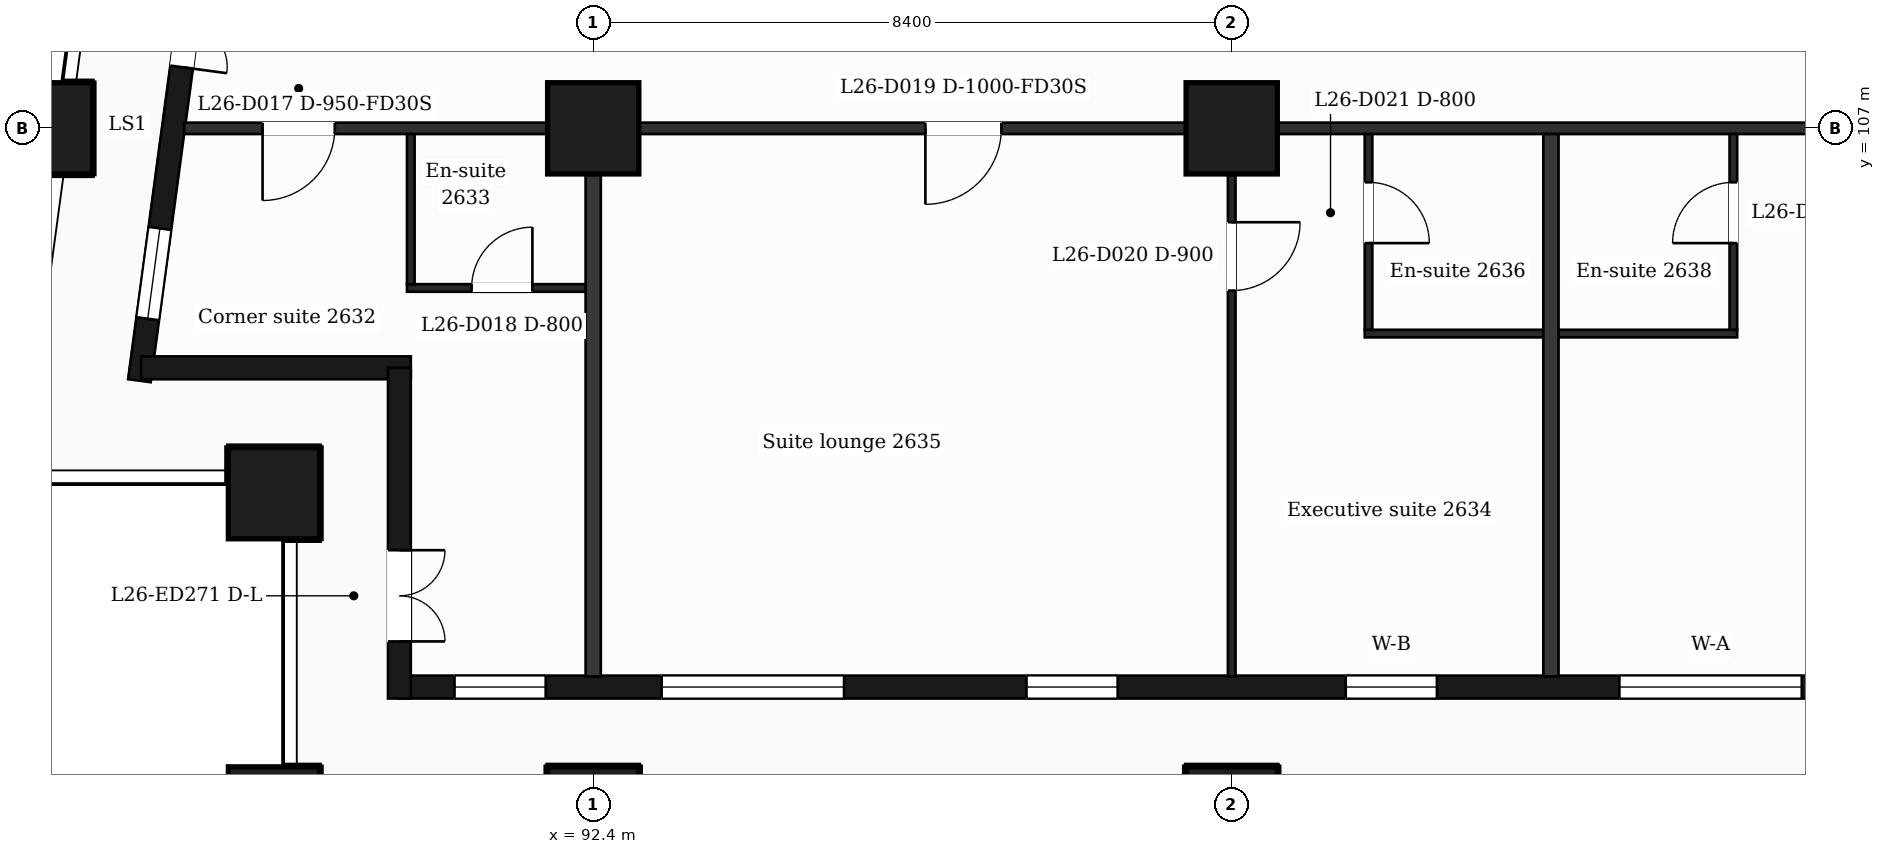
"""IFC4 building model, lengths in metres.
Left out: names, types, materials, properties, quantities, classifications, styles, units other than length and angle.
Written with IfcOpenShell. Run it as: python <this file> out.ifc"""

import sys

from ifc_helpers import new_model, si_unit, direction, frame, frame_2d, origin, origin_2d, place, context, subcontext, project, spatial, rectangle, extrude, element, fill, save


model = new_model("IFC4")
c1 = context("Model", 3, precision=1e-05, world=origin(), true_north=direction((0.0, 1.0)))
c2 = subcontext(c1, "Body", "Model", "MODEL_VIEW")
j1 = project(units=[si_unit("LENGTHUNIT", "METRE"), si_unit("PLANEANGLEUNIT", "RADIAN")], contexts=[c1])
p1 = place(None, origin())
s1 = spatial("IfcSite", under=j1, at=p1, CompositionType="ELEMENT")
p2 = place(p1, origin())
s2 = spatial("IfcBuilding", under=s1, at=p2, CompositionType="ELEMENT")
p3 = place(p2, frame((0.0, 0.0, 113.2)))
s3 = spatial("IfcBuildingStorey", under=s2, at=p3, CompositionType="ELEMENT", Elevation=113.2)
for number, where, z_axis, x_axis in (
    (1, (92.4, 98.0, 0.0), (0.0, 0.0, 1.0), (1.0, 0.0, 0.0)),
    (2, (100.8, 98.0, 0.0), (0.0, 0.0, 1.0), (1.0, 0.0, 0.0)),
    (3, (88.2, 98.0, 0.0), (0.0, 0.0, 1.0), (1.0, 0.0, 0.0)),
    (4, (88.2, 102.2, 0.0), (0.0, 0.0, 1.0), (1.0, 0.0, 0.0)),
    (5, (92.4, 107.0, 0.0), (0.0, 0.0, 1.0), (1.0, 0.0, 0.0)),
    (6, (100.8, 107.0, 0.0), (0.0, 0.0, 1.0), (1.0, 0.0, 0.0)),
    (7, (85.211, 107.0, 0.0), (0.0, 0.0, 1.0), (1.0, 0.0, 0.0)),
):
    element("IfcColumn", number, at=place(p3, frame(where, z_axis=z_axis, x_axis=x_axis)), inside=s3, PredefinedType="COLUMN", context=c2, shape_type="SweptSolid", body=[
        extrude(rectangle(XDim=1.2, YDim=1.2, at=origin_2d()), origin(), (0.0, 0.0, 1.0), 3.7),
    ])
p4 = place(p3, frame((89.85, 99.65, 0.0), z_axis=(0.0, 0.0, 1.0), x_axis=(1.0, 0.0, 0.0)))
e8 = element("IfcWall", 8, at=p4, inside=s3, PredefinedType="SOLIDWALL", context=c2, shape_type="SweptSolid", body=[
    extrude(rectangle(XDim=47.25, YDim=0.3, at=frame_2d((23.625, 0.0))), origin(), (0.0, 0.0, 1.0), 3.38),
])
p5 = place(p4, frame((0.725, 0.0, 0.9)))
e9 = element("IfcOpeningElement", 9, at=p5, cuts=e8, PredefinedType="OPENING", context=c2, shape_type="SweptSolid", body=[
    extrude(rectangle(XDim=1.2, YDim=2.1, at=frame_2d((0.6, 1.05))), frame((0.0, 0.16, 0.0), z_axis=(0.0, -1.0, 0.0), x_axis=(1.0, 0.0, 0.0)), (0.0, 0.0, 1.0), 0.32),
])
p6 = place(p4, frame((3.45, 0.0, 0.9)))
e10 = element("IfcOpeningElement", 10, at=p6, cuts=e8, PredefinedType="OPENING", context=c2, shape_type="SweptSolid", body=[
    extrude(rectangle(XDim=2.4, YDim=2.1, at=frame_2d((1.2, 1.05))), frame((0.0, 0.16, 0.0), z_axis=(0.0, -1.0, 0.0), x_axis=(1.0, 0.0, 0.0)), (0.0, 0.0, 1.0), 0.32),
])
p7 = place(p4, frame((8.25, 0.0, 0.9)))
e11 = element("IfcOpeningElement", 11, at=p7, cuts=e8, PredefinedType="OPENING", context=c2, shape_type="SweptSolid", body=[
    extrude(rectangle(XDim=1.2, YDim=2.1, at=frame_2d((0.6, 1.05))), frame((0.0, 0.16, 0.0), z_axis=(0.0, -1.0, 0.0), x_axis=(1.0, 0.0, 0.0)), (0.0, 0.0, 1.0), 0.32),
])
p8 = place(p4, frame((12.45, 0.0, 0.9)))
e12 = element("IfcOpeningElement", 12, at=p8, cuts=e8, PredefinedType="OPENING", context=c2, shape_type="SweptSolid", body=[
    extrude(rectangle(XDim=1.2, YDim=2.1, at=frame_2d((0.6, 1.05))), frame((0.0, 0.16, 0.0), z_axis=(0.0, -1.0, 0.0), x_axis=(1.0, 0.0, 0.0)), (0.0, 0.0, 1.0), 0.32),
])
p9 = place(p4, frame((16.05, 0.0, 0.9)))
e13 = element("IfcOpeningElement", 13, at=p9, cuts=e8, PredefinedType="OPENING", context=c2, shape_type="SweptSolid", body=[
    extrude(rectangle(XDim=2.4, YDim=2.1, at=frame_2d((1.2, 1.05))), frame((0.0, 0.16, 0.0), z_axis=(0.0, -1.0, 0.0), x_axis=(1.0, 0.0, 0.0)), (0.0, 0.0, 1.0), 0.32),
])
p10 = place(p4, frame((20.25, 0.0, 0.9)))
e14 = element("IfcOpeningElement", 14, at=p10, cuts=e8, PredefinedType="OPENING", context=c2, shape_type="SweptSolid", body=[
    extrude(rectangle(XDim=2.4, YDim=2.1, at=frame_2d((1.2, 1.05))), frame((0.0, 0.16, 0.0), z_axis=(0.0, -1.0, 0.0), x_axis=(1.0, 0.0, 0.0)), (0.0, 0.0, 1.0), 0.32),
])
p11 = place(p4, frame((25.05, 0.0, 0.0)))
e15 = element("IfcOpeningElement", 15, at=p11, cuts=e8, PredefinedType="OPENING", context=c2, shape_type="SweptSolid", body=[
    extrude(rectangle(XDim=1.2, YDim=2.4, at=frame_2d((0.6, 1.2))), frame((0.0, 0.16, 0.0), z_axis=(0.0, -1.0, 0.0), x_axis=(1.0, 0.0, 0.0)), (0.0, 0.0, 1.0), 0.32),
])
p12 = place(p4, frame((28.65, 0.0, 0.9)))
e16 = element("IfcOpeningElement", 16, at=p12, cuts=e8, PredefinedType="OPENING", context=c2, shape_type="SweptSolid", body=[
    extrude(rectangle(XDim=2.4, YDim=2.1, at=frame_2d((1.2, 1.05))), frame((0.0, 0.16, 0.0), z_axis=(0.0, -1.0, 0.0), x_axis=(1.0, 0.0, 0.0)), (0.0, 0.0, 1.0), 0.32),
])
p13 = place(p4, frame((32.85, 0.0, 0.9)))
e17 = element("IfcOpeningElement", 17, at=p13, cuts=e8, PredefinedType="OPENING", context=c2, shape_type="SweptSolid", body=[
    extrude(rectangle(XDim=2.4, YDim=2.1, at=frame_2d((1.2, 1.05))), frame((0.0, 0.16, 0.0), z_axis=(0.0, -1.0, 0.0), x_axis=(1.0, 0.0, 0.0)), (0.0, 0.0, 1.0), 0.32),
])
p14 = place(p4, frame((37.65, 0.0, 0.9)))
e18 = element("IfcOpeningElement", 18, at=p14, cuts=e8, PredefinedType="OPENING", context=c2, shape_type="SweptSolid", body=[
    extrude(rectangle(XDim=1.2, YDim=2.1, at=frame_2d((0.6, 1.05))), frame((0.0, 0.16, 0.0), z_axis=(0.0, -1.0, 0.0), x_axis=(1.0, 0.0, 0.0)), (0.0, 0.0, 1.0), 0.32),
])
p15 = place(p4, frame((41.85, 0.0, 0.9)))
e19 = element("IfcOpeningElement", 19, at=p15, cuts=e8, PredefinedType="OPENING", context=c2, shape_type="SweptSolid", body=[
    extrude(rectangle(XDim=1.2, YDim=2.1, at=frame_2d((0.6, 1.05))), frame((0.0, 0.16, 0.0), z_axis=(0.0, -1.0, 0.0), x_axis=(1.0, 0.0, 0.0)), (0.0, 0.0, 1.0), 0.32),
])
p16 = place(p4, frame((45.25, 0.0, 0.9)))
e20 = element("IfcOpeningElement", 20, at=p16, cuts=e8, PredefinedType="OPENING", context=c2, shape_type="SweptSolid", body=[
    extrude(rectangle(XDim=1.2, YDim=2.1, at=frame_2d((0.6, 1.05))), frame((0.0, 0.16, 0.0), z_axis=(0.0, -1.0, 0.0), x_axis=(1.0, 0.0, 0.0)), (0.0, 0.0, 1.0), 0.32),
])
p17 = place(p3, frame((87.334, 110.4, 0.0), z_axis=(0.0, 0.0, 1.0), x_axis=(-0.133437175554, -0.991057273915, 0.0)))
e21 = element("IfcWall", 21, at=p17, inside=s3, PredefinedType="SOLIDWALL", context=c2, shape_type="SweptSolid", body=[
    extrude(rectangle(XDim=6.781, YDim=0.3, at=frame_2d((3.39, 0.0))), origin(), (0.0, 0.0, 1.0), 3.38),
])
p18 = place(p17, frame((1.418, 0.0, 0.0)))
e22 = element("IfcOpeningElement", 22, at=p18, cuts=e21, PredefinedType="OPENING", context=c2, shape_type="SweptSolid", body=[
    extrude(rectangle(XDim=1.2, YDim=2.4, at=frame_2d((0.6, 1.2))), frame((0.0, 0.16, 0.0), z_axis=(0.0, -1.0, 0.0), x_axis=(1.0, 0.0, 0.0)), (0.0, 0.0, 1.0), 0.32),
])
p19 = place(p17, frame((4.758, 0.0, 0.9)))
e23 = element("IfcOpeningElement", 23, at=p19, cuts=e21, PredefinedType="OPENING", context=c2, shape_type="SweptSolid", body=[
    extrude(rectangle(XDim=1.2, YDim=2.1, at=frame_2d((0.6, 1.05))), frame((0.0, 0.16, 0.0), z_axis=(0.0, -1.0, 0.0), x_axis=(1.0, 0.0, 0.0)), (0.0, 0.0, 1.0), 0.32),
])
p20 = place(p3, frame((86.452, 103.85, 0.0), z_axis=(0.0, 0.0, 1.0), x_axis=(1.0, 0.0, 0.0)))
e24 = element("IfcWall", 24, at=p20, inside=s3, PredefinedType="SOLIDWALL", context=c2, shape_type="SweptSolid", body=[
    extrude(rectangle(XDim=3.548, YDim=0.3, at=frame_2d((1.774, 0.0))), origin(), (0.0, 0.0, 1.0), 3.38),
])
p21 = place(p3, frame((89.85, 103.85, 0.0), z_axis=(0.0, 0.0, 1.0), x_axis=(0.0, -1.0, 0.0)))
e25 = element("IfcWall", 25, at=p21, inside=s3, PredefinedType="SOLIDWALL", context=c2, shape_type="SweptSolid", body=[
    extrude(rectangle(XDim=4.35, YDim=0.3, at=frame_2d((2.175, 0.0))), origin(), (0.0, 0.0, 1.0), 3.38),
])
p22 = place(p21, frame((2.4, 0.0, 0.0)))
e26 = element("IfcOpeningElement", 26, at=p22, cuts=e25, PredefinedType="OPENING", context=c2, shape_type="SweptSolid", body=[
    extrude(rectangle(XDim=1.2, YDim=2.4, at=frame_2d((0.6, 1.2))), frame((0.0, 0.16, 0.0), z_axis=(0.0, -1.0, 0.0), x_axis=(1.0, 0.0, 0.0)), (0.0, 0.0, 1.0), 0.32),
])
p23 = place(p3, frame((102.55, 104.3, 0.0), z_axis=(0.0, 0.0, 1.0), x_axis=(1.0, 0.0, 0.0)))
e27 = element("IfcWall", 27, at=p23, inside=s3, PredefinedType="PARTITIONING", context=c2, shape_type="SweptSolid", body=[
    extrude(rectangle(XDim=4.9, YDim=0.1, at=frame_2d((2.45, 0.0))), origin(), (0.0, 0.0, 1.0), 3.38),
])
p24 = place(p3, frame((89.95, 104.9, 0.0), z_axis=(0.0, 0.0, 1.0), x_axis=(1.0, 0.0, 0.0)))
e28 = element("IfcWall", 28, at=p24, inside=s3, PredefinedType="PARTITIONING", context=c2, shape_type="SweptSolid", body=[
    extrude(rectangle(XDim=2.45, YDim=0.1, at=frame_2d((1.225, 0.0))), origin(), (0.0, 0.0, 1.0), 3.38),
])
p25 = place(p24, frame((0.85, 0.0, 0.0)))
e29 = element("IfcOpeningElement", 29, at=p25, cuts=e28, PredefinedType="OPENING", context=c2, shape_type="SweptSolid", body=[
    extrude(rectangle(XDim=0.8, YDim=2.1, at=frame_2d((0.4, 1.05))), frame((0.0, 0.06, 0.0), z_axis=(0.0, -1.0, 0.0), x_axis=(1.0, 0.0, 0.0)), (0.0, 0.0, 1.0), 0.12),
])
p26 = place(p3, frame((87.018, 107.0, 0.0), z_axis=(0.0, 0.0, 1.0), x_axis=(1.0, 0.0, 0.0)))
e30 = element("IfcWall", 30, at=p26, inside=s3, PredefinedType="PARTITIONING", context=c2, shape_type="SweptSolid", body=[
    extrude(rectangle(XDim=52.765, YDim=0.15, at=frame_2d((26.382, 0.0))), origin(), (0.0, 0.0, 1.0), 3.38),
])
p27 = place(p26, frame((1.032, 0.0, 0.0)))
e31 = element("IfcOpeningElement", 31, at=p27, cuts=e30, PredefinedType="OPENING", context=c2, shape_type="SweptSolid", body=[
    extrude(rectangle(XDim=0.95, YDim=2.1, at=frame_2d((0.475, 1.05))), frame((0.0, 0.085, 0.0), z_axis=(0.0, -1.0, 0.0), x_axis=(1.0, 0.0, 0.0)), (0.0, 0.0, 1.0), 0.17),
])
p28 = place(p26, frame((9.752, 0.0, 0.0)))
e32 = element("IfcOpeningElement", 32, at=p28, cuts=e30, PredefinedType="OPENING", context=c2, shape_type="SweptSolid", body=[
    extrude(rectangle(XDim=1.0, YDim=2.1, at=frame_2d((0.5, 1.05))), frame((0.0, 0.085, 0.0), z_axis=(0.0, -1.0, 0.0), x_axis=(1.0, 0.0, 0.0)), (0.0, 0.0, 1.0), 0.17),
])
p29 = place(p26, frame((23.995, 0.0, 0.0)))
e33 = element("IfcOpeningElement", 33, at=p29, cuts=e30, PredefinedType="OPENING", context=c2, shape_type="SweptSolid", body=[
    extrude(rectangle(XDim=0.95, YDim=2.1, at=frame_2d((0.475, 1.05))), frame((0.0, 0.085, 0.0), z_axis=(0.0, -1.0, 0.0), x_axis=(1.0, 0.0, 0.0)), (0.0, 0.0, 1.0), 0.17),
])
p30 = place(p26, frame((28.645, 0.0, 0.0)))
e34 = element("IfcOpeningElement", 34, at=p30, cuts=e30, PredefinedType="OPENING", context=c2, shape_type="SweptSolid", body=[
    extrude(rectangle(XDim=0.95, YDim=2.1, at=frame_2d((0.475, 1.05))), frame((0.0, 0.085, 0.0), z_axis=(0.0, -1.0, 0.0), x_axis=(1.0, 0.0, 0.0)), (0.0, 0.0, 1.0), 0.17),
])
p31 = place(p26, frame((36.632, 0.0, 0.0)))
e35 = element("IfcOpeningElement", 35, at=p31, cuts=e30, PredefinedType="OPENING", context=c2, shape_type="SweptSolid", body=[
    extrude(rectangle(XDim=1.0, YDim=2.1, at=frame_2d((0.5, 1.05))), frame((0.0, 0.085, 0.0), z_axis=(0.0, -1.0, 0.0), x_axis=(1.0, 0.0, 0.0)), (0.0, 0.0, 1.0), 0.17),
])
p32 = place(p26, frame((41.957, 0.0, 0.0)))
e36 = element("IfcOpeningElement", 36, at=p32, cuts=e30, PredefinedType="OPENING", context=c2, shape_type="SweptSolid", body=[
    extrude(rectangle(XDim=0.95, YDim=2.1, at=frame_2d((0.475, 1.05))), frame((0.0, 0.085, 0.0), z_axis=(0.0, -1.0, 0.0), x_axis=(1.0, 0.0, 0.0)), (0.0, 0.0, 1.0), 0.17),
])
p33 = place(p26, frame((45.607, 0.0, 0.0)))
e37 = element("IfcOpeningElement", 37, at=p33, cuts=e30, PredefinedType="OPENING", context=c2, shape_type="SweptSolid", body=[
    extrude(rectangle(XDim=0.95, YDim=2.1, at=frame_2d((0.475, 1.05))), frame((0.0, 0.085, 0.0), z_axis=(0.0, -1.0, 0.0), x_axis=(1.0, 0.0, 0.0)), (0.0, 0.0, 1.0), 0.17),
])
p34 = place(p26, frame((48.767, 0.0, 0.0)))
e38 = element("IfcOpeningElement", 38, at=p34, cuts=e30, PredefinedType="OPENING", context=c2, shape_type="SweptSolid", body=[
    extrude(rectangle(XDim=0.95, YDim=2.1, at=frame_2d((0.475, 1.05))), frame((0.0, 0.085, 0.0), z_axis=(0.0, -1.0, 0.0), x_axis=(1.0, 0.0, 0.0)), (0.0, 0.0, 1.0), 0.17),
])
p35 = place(p3, frame((90.0, 104.95, 0.0), z_axis=(0.0, 0.0, 1.0), x_axis=(0.0, 1.0, 0.0)))
e39 = element("IfcWall", 39, at=p35, inside=s3, PredefinedType="PARTITIONING", context=c2, shape_type="SweptSolid", body=[
    extrude(rectangle(XDim=1.975, YDim=0.1, at=frame_2d((0.988, 0.0))), origin(), (0.0, 0.0, 1.0), 3.38),
])
p36 = place(p3, frame((92.4, 99.79, 0.0), z_axis=(0.0, 0.0, 1.0), x_axis=(0.0, 1.0, 0.0)))
e40 = element("IfcWall", 40, at=p36, inside=s3, PredefinedType="PARTITIONING", context=c2, shape_type="SweptSolid", body=[
    extrude(rectangle(XDim=7.135, YDim=0.2, at=frame_2d((3.567, 0.0))), origin(), (0.0, 0.0, 1.0), 3.38),
])
p37 = place(p3, frame((100.8, 99.79, 0.0), z_axis=(0.0, 0.0, 1.0), x_axis=(0.0, 1.0, 0.0)))
e41 = element("IfcWall", 41, at=p37, inside=s3, PredefinedType="PARTITIONING", context=c2, shape_type="SweptSolid", body=[
    extrude(rectangle(XDim=7.135, YDim=0.1, at=frame_2d((3.567, 0.0))), origin(), (0.0, 0.0, 1.0), 3.38),
])
p38 = place(p37, frame((5.075, 0.0, 0.0)))
e42 = element("IfcOpeningElement", 42, at=p38, cuts=e41, PredefinedType="OPENING", context=c2, shape_type="SweptSolid", body=[
    extrude(rectangle(XDim=0.9, YDim=2.1, at=frame_2d((0.45, 1.05))), frame((0.0, 0.06, 0.0), z_axis=(0.0, -1.0, 0.0), x_axis=(1.0, 0.0, 0.0)), (0.0, 0.0, 1.0), 0.12),
])
p39 = place(p3, frame((102.6, 104.35, 0.0), z_axis=(0.0, 0.0, 1.0), x_axis=(0.0, 1.0, 0.0)))
e43 = element("IfcWall", 43, at=p39, inside=s3, PredefinedType="PARTITIONING", context=c2, shape_type="SweptSolid", body=[
    extrude(rectangle(XDim=2.575, YDim=0.1, at=frame_2d((1.288, 0.0))), origin(), (0.0, 0.0, 1.0), 3.38),
])
p40 = place(p39, frame((1.14, 0.0, 0.0)))
e44 = element("IfcOpeningElement", 44, at=p40, cuts=e43, PredefinedType="OPENING", context=c2, shape_type="SweptSolid", body=[
    extrude(rectangle(XDim=0.8, YDim=2.1, at=frame_2d((0.4, 1.05))), frame((0.0, 0.06, 0.0), z_axis=(0.0, -1.0, 0.0), x_axis=(1.0, 0.0, 0.0)), (0.0, 0.0, 1.0), 0.12),
])
p41 = place(p3, frame((105.0, 99.79, 0.0), z_axis=(0.0, 0.0, 1.0), x_axis=(0.0, 1.0, 0.0)))
e45 = element("IfcWall", 45, at=p41, inside=s3, PredefinedType="PARTITIONING", context=c2, shape_type="SweptSolid", body=[
    extrude(rectangle(XDim=7.135, YDim=0.2, at=frame_2d((3.567, 0.0))), origin(), (0.0, 0.0, 1.0), 3.38),
])
p42 = place(p3, frame((107.4, 104.35, 0.0), z_axis=(0.0, 0.0, 1.0), x_axis=(0.0, 1.0, 0.0)))
e46 = element("IfcWall", 46, at=p42, inside=s3, PredefinedType="PARTITIONING", context=c2, shape_type="SweptSolid", body=[
    extrude(rectangle(XDim=2.575, YDim=0.1, at=frame_2d((1.288, 0.0))), origin(), (0.0, 0.0, 1.0), 3.38),
])
p43 = place(p42, frame((1.14, 0.0, 0.0)))
e47 = element("IfcOpeningElement", 47, at=p43, cuts=e46, PredefinedType="OPENING", context=c2, shape_type="SweptSolid", body=[
    extrude(rectangle(XDim=0.8, YDim=2.1, at=frame_2d((0.4, 1.05))), frame((0.0, 0.06, 0.0), z_axis=(0.0, -1.0, 0.0), x_axis=(1.0, 0.0, 0.0)), (0.0, 0.0, 1.0), 0.12),
])
p44 = place(p5, origin())
e48 = element("IfcWindow", 48, at=p44, inside=s3, PartitioningType="SINGLE_PANEL", PredefinedType="WINDOW", context=c2, shape_type="SweptSolid", body=[
    extrude(rectangle(XDim=1.2, YDim=2.1, at=frame_2d((0.6, 1.05))), frame((0.0, 0.03, 0.0), z_axis=(0.0, -1.0, 0.0), x_axis=(1.0, 0.0, 0.0)), (0.0, 0.0, 1.0), 0.06),
])
fill(e9, e48)
p45 = place(p6, origin())
e49 = element("IfcWindow", 49, at=p45, inside=s3, PartitioningType="SINGLE_PANEL", PredefinedType="WINDOW", context=c2, shape_type="SweptSolid", body=[
    extrude(rectangle(XDim=2.4, YDim=2.1, at=frame_2d((1.2, 1.05))), frame((0.0, 0.03, 0.0), z_axis=(0.0, -1.0, 0.0), x_axis=(1.0, 0.0, 0.0)), (0.0, 0.0, 1.0), 0.06),
])
fill(e10, e49)
p46 = place(p7, origin())
e50 = element("IfcWindow", 50, at=p46, inside=s3, PartitioningType="SINGLE_PANEL", PredefinedType="WINDOW", context=c2, shape_type="SweptSolid", body=[
    extrude(rectangle(XDim=1.2, YDim=2.1, at=frame_2d((0.6, 1.05))), frame((0.0, 0.03, 0.0), z_axis=(0.0, -1.0, 0.0), x_axis=(1.0, 0.0, 0.0)), (0.0, 0.0, 1.0), 0.06),
])
fill(e11, e50)
p47 = place(p8, origin())
e51 = element("IfcWindow", 51, at=p47, inside=s3, PartitioningType="SINGLE_PANEL", PredefinedType="WINDOW", context=c2, shape_type="SweptSolid", body=[
    extrude(rectangle(XDim=1.2, YDim=2.1, at=frame_2d((0.6, 1.05))), frame((0.0, 0.03, 0.0), z_axis=(0.0, -1.0, 0.0), x_axis=(1.0, 0.0, 0.0)), (0.0, 0.0, 1.0), 0.06),
])
fill(e12, e51)
p48 = place(p9, origin())
e52 = element("IfcWindow", 52, at=p48, inside=s3, PartitioningType="SINGLE_PANEL", PredefinedType="WINDOW", context=c2, shape_type="SweptSolid", body=[
    extrude(rectangle(XDim=2.4, YDim=2.1, at=frame_2d((1.2, 1.05))), frame((0.0, 0.03, 0.0), z_axis=(0.0, -1.0, 0.0), x_axis=(1.0, 0.0, 0.0)), (0.0, 0.0, 1.0), 0.06),
])
fill(e13, e52)
p49 = place(p18, origin())
e53 = element("IfcDoor", 53, at=p49, inside=s3, OperationType="DOUBLE_DOOR_SINGLE_SWING", PredefinedType="DOOR", context=c2, shape_type="SweptSolid", body=[
    extrude(rectangle(XDim=1.2, YDim=2.4, at=frame_2d((0.6, 1.2))), frame((0.0, 0.025, 0.0), z_axis=(0.0, -1.0, 0.0), x_axis=(1.0, 0.0, 0.0)), (0.0, 0.0, 1.0), 0.05),
])
fill(e22, e53)
p50 = place(p19, origin())
e54 = element("IfcWindow", 54, at=p50, inside=s3, PartitioningType="SINGLE_PANEL", PredefinedType="WINDOW", context=c2, shape_type="SweptSolid", body=[
    extrude(rectangle(XDim=1.2, YDim=2.1, at=frame_2d((0.6, 1.05))), frame((0.0, 0.03, 0.0), z_axis=(0.0, -1.0, 0.0), x_axis=(1.0, 0.0, 0.0)), (0.0, 0.0, 1.0), 0.06),
])
fill(e23, e54)
p51 = place(p22, origin())
e55 = element("IfcDoor", 55, at=p51, inside=s3, OperationType="DOUBLE_DOOR_SINGLE_SWING", PredefinedType="DOOR", context=c2, shape_type="SweptSolid", body=[
    extrude(rectangle(XDim=1.2, YDim=2.4, at=frame_2d((0.6, 1.2))), frame((0.0, 0.025, 0.0), z_axis=(0.0, -1.0, 0.0), x_axis=(1.0, 0.0, 0.0)), (0.0, 0.0, 1.0), 0.05),
])
fill(e26, e55)
p52 = place(p27, origin())
e56 = element("IfcDoor", 56, at=p52, inside=s3, OperationType="SINGLE_SWING_LEFT", PredefinedType="DOOR", context=c2, shape_type="SweptSolid", body=[
    extrude(rectangle(XDim=0.95, YDim=2.1, at=frame_2d((0.475, 1.05))), frame((0.0, 0.025, 0.0), z_axis=(0.0, -1.0, 0.0), x_axis=(1.0, 0.0, 0.0)), (0.0, 0.0, 1.0), 0.05),
])
fill(e31, e56)
p53 = place(p25, origin())
e57 = element("IfcDoor", 57, at=p53, inside=s3, OperationType="SINGLE_SWING_RIGHT", PredefinedType="DOOR", context=c2, shape_type="SweptSolid", body=[
    extrude(rectangle(XDim=0.8, YDim=2.1, at=frame_2d((0.4, 1.05))), frame((0.0, 0.025, 0.0), z_axis=(0.0, -1.0, 0.0), x_axis=(1.0, 0.0, 0.0)), (0.0, 0.0, 1.0), 0.05),
])
fill(e29, e57)
p54 = place(p28, origin())
e58 = element("IfcDoor", 58, at=p54, inside=s3, OperationType="SINGLE_SWING_LEFT", PredefinedType="DOOR", context=c2, shape_type="SweptSolid", body=[
    extrude(rectangle(XDim=1.0, YDim=2.1, at=frame_2d((0.5, 1.05))), frame((0.0, 0.025, 0.0), z_axis=(0.0, -1.0, 0.0), x_axis=(1.0, 0.0, 0.0)), (0.0, 0.0, 1.0), 0.05),
])
fill(e32, e58)
p55 = place(p38, origin())
e59 = element("IfcDoor", 59, at=p55, inside=s3, OperationType="SINGLE_SWING_RIGHT", PredefinedType="DOOR", context=c2, shape_type="SweptSolid", body=[
    extrude(rectangle(XDim=0.9, YDim=2.1, at=frame_2d((0.45, 1.05))), frame((0.0, 0.025, 0.0), z_axis=(0.0, -1.0, 0.0), x_axis=(1.0, 0.0, 0.0)), (0.0, 0.0, 1.0), 0.05),
])
fill(e42, e59)
p56 = place(p40, origin())
e60 = element("IfcDoor", 60, at=p56, inside=s3, OperationType="SINGLE_SWING_LEFT", PredefinedType="DOOR", context=c2, shape_type="SweptSolid", body=[
    extrude(rectangle(XDim=0.8, YDim=2.1, at=frame_2d((0.4, 1.05))), frame((0.0, 0.025, 0.0), z_axis=(0.0, -1.0, 0.0), x_axis=(1.0, 0.0, 0.0)), (0.0, 0.0, 1.0), 0.05),
])
fill(e44, e60)
p57 = place(p43, origin())
e61 = element("IfcDoor", 61, at=p57, inside=s3, OperationType="SINGLE_SWING_LEFT", PredefinedType="DOOR", context=c2, shape_type="SweptSolid", body=[
    extrude(rectangle(XDim=0.8, YDim=2.1, at=frame_2d((0.4, 1.05))), frame((0.0, 0.025, 0.0), z_axis=(0.0, -1.0, 0.0), x_axis=(1.0, 0.0, 0.0)), (0.0, 0.0, 1.0), 0.05),
])
fill(e47, e61)
save(model, sys.argv[1])
